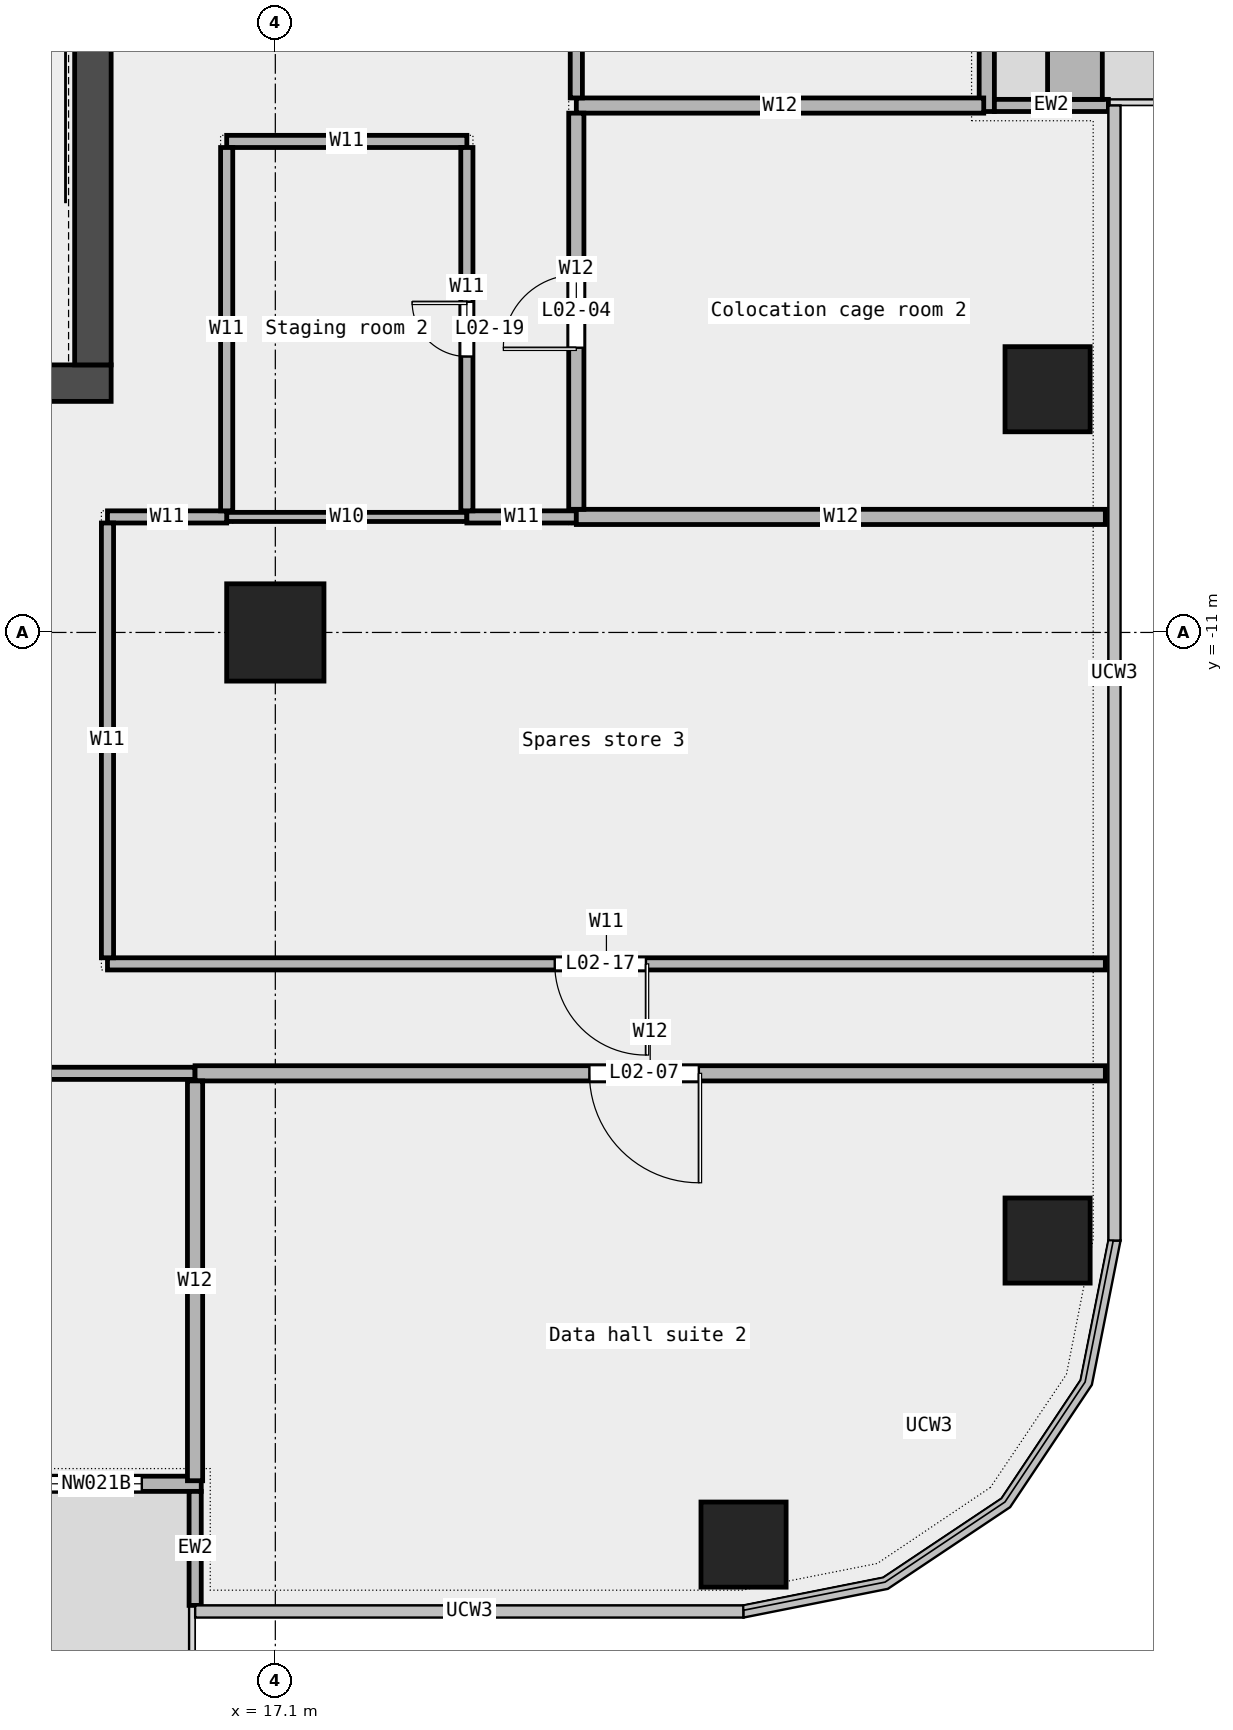
"""IFC4 building model, lengths in metres.
Left out: names, types, materials, properties, quantities, classifications, styles, units other than length and angle.
Written with IfcOpenShell. Run it as: python <this file> out.ifc"""

import sys

from ifc_helpers import new_model, si_unit, direction, frame, frame_2d, origin, origin_2d, place, context, subcontext, project, spatial, rectangle, extrude, element, fill, save


model = new_model("IFC4")
c1 = context("Model", 3, precision=1e-05, world=origin(), true_north=direction((0.0, 1.0)))
c2 = subcontext(c1, "Body", "Model", "MODEL_VIEW")
j1 = project(units=[si_unit("LENGTHUNIT", "METRE"), si_unit("PLANEANGLEUNIT", "RADIAN")], contexts=[c1])
p1 = place(None, origin())
s1 = spatial("IfcSite", under=j1, at=p1, CompositionType="ELEMENT")
p2 = place(p1, origin())
s2 = spatial("IfcBuilding", under=s1, at=p2, CompositionType="ELEMENT")
p3 = place(p2, frame((0.0, 0.0, 14.5)))
s3 = spatial("IfcBuildingStorey", under=s2, at=p3, CompositionType="ELEMENT", Elevation=14.5)
for number, where, z_axis, x_axis in (
    (1, (24.8, -26.0, 0.0), (0.0, 0.0, 1.0), (1.0, 0.0, 0.0)),
    (2, (29.8, -21.0, 0.0), (0.0, 0.0, 1.0), (1.0, 0.0, 0.0)),
    (3, (29.8, -7.0, 0.0), (0.0, 0.0, 1.0), (1.0, 0.0, 0.0)),
):
    element("IfcColumn", number, at=place(p3, frame(where, z_axis=z_axis, x_axis=x_axis)), inside=s3, PredefinedType="COLUMN", context=c2, shape_type="SweptSolid", body=[
        extrude(rectangle(XDim=1.4, YDim=1.4, at=origin_2d()), origin(), (0.0, 0.0, 1.0), 5.0),
    ])
p4 = place(p3, frame((17.1, -11.0, 0.0), z_axis=(0.0, 0.0, 1.0), x_axis=(1.0, 0.0, 0.0)))
e4 = element("IfcColumn", 4, at=p4, inside=s3, PredefinedType="COLUMN", context=c2, shape_type="SweptSolid", body=[
    extrude(rectangle(XDim=1.6, YDim=1.6, at=origin_2d()), origin(), (0.0, 0.0, 1.0), 5.0),
])
p5 = place(p3, frame((2.155, -25.0, 0.0), z_axis=(0.0, 0.0, 1.0), x_axis=(1.0, 0.0, 0.0)))
e5 = element("IfcWall", 5, at=p5, inside=s3, PredefinedType="STANDARD", context=c2, shape_type="SweptSolid", body=[
    extrude(rectangle(XDim=13.727, YDim=0.25, at=frame_2d((6.864, 0.0))), origin(), (0.0, 0.0, 1.0), 5.0),
])
p6 = place(p5, frame((1.75, 0.0, 0.45)))
e6 = element("IfcOpeningElement", 6, at=p6, cuts=e5, PredefinedType="OPENING", context=c2, shape_type="SweptSolid", body=[
    extrude(rectangle(XDim=1.5, YDim=3.0, at=frame_2d((0.75, 1.5))), frame((0.0, 0.137, 0.0), z_axis=(0.0, -1.0, 0.0), x_axis=(1.0, 0.0, 0.0)), (0.0, 0.0, 1.0), 0.274),
])
p7 = place(p5, frame((6.0, 0.0, 0.0)))
e7 = element("IfcOpeningElement", 7, at=p7, cuts=e5, PredefinedType="OPENING", context=c2, shape_type="SweptSolid", body=[
    extrude(rectangle(XDim=1.8, YDim=2.4, at=frame_2d((0.9, 1.2))), frame((0.0, 0.137, 0.0), z_axis=(0.0, -1.0, 0.0), x_axis=(1.0, 0.0, 0.0)), (0.0, 0.0, 1.0), 0.274),
])
p8 = place(p5, frame((11.25, 0.0, 0.45)))
e8 = element("IfcOpeningElement", 8, at=p8, cuts=e5, PredefinedType="OPENING", context=c2, shape_type="SweptSolid", body=[
    extrude(rectangle(XDim=1.5, YDim=3.0, at=frame_2d((0.75, 1.5))), frame((0.0, 0.137, 0.0), z_axis=(0.0, -1.0, 0.0), x_axis=(1.0, 0.0, 0.0)), (0.0, 0.0, 1.0), 0.274),
])
p9 = place(p3, frame((15.782, -27.0, 0.0), z_axis=(0.0, 0.0, 1.0), x_axis=(0.0, 1.0, 0.0)))
e9 = element("IfcWall", 9, at=p9, inside=s3, PredefinedType="STANDARD", context=c2, shape_type="SweptSolid", body=[
    extrude(rectangle(XDim=1.875, YDim=0.2, at=frame_2d((0.938, 0.0))), origin(), (0.0, 0.0, 1.0), 5.0),
])
p10 = place(p3, frame((28.8, -2.433, 0.0), z_axis=(0.0, 0.0, 1.0), x_axis=(0.0, 1.0, 0.0)))
e10 = element("IfcWall", 10, at=p10, inside=s3, PredefinedType="STANDARD", context=c2, shape_type="SweptSolid", body=[
    extrude(rectangle(XDim=14.2, YDim=0.25, at=frame_2d((7.1, 0.0))), origin(), (0.0, 0.0, 1.0), 5.0),
])
p11 = place(p10, frame((1.75, 0.0, 0.45)))
e11 = element("IfcOpeningElement", 11, at=p11, cuts=e10, PredefinedType="OPENING", context=c2, shape_type="SweptSolid", body=[
    extrude(rectangle(XDim=1.5, YDim=3.0, at=frame_2d((0.75, 1.5))), frame((0.0, 0.137, 0.0), z_axis=(0.0, -1.0, 0.0), x_axis=(1.0, 0.0, 0.0)), (0.0, 0.0, 1.0), 0.274),
])
p12 = place(p10, frame((6.25, 0.0, 0.0)))
e12 = element("IfcOpeningElement", 12, at=p12, cuts=e10, PredefinedType="OPENING", context=c2, shape_type="SweptSolid", body=[
    extrude(rectangle(XDim=1.8, YDim=2.4, at=frame_2d((0.9, 1.2))), frame((0.0, 0.137, 0.0), z_axis=(0.0, -1.0, 0.0), x_axis=(1.0, 0.0, 0.0)), (0.0, 0.0, 1.0), 0.274),
])
p13 = place(p10, frame((11.0, 0.0, 0.45)))
e13 = element("IfcOpeningElement", 13, at=p13, cuts=e10, PredefinedType="OPENING", context=c2, shape_type="SweptSolid", body=[
    extrude(rectangle(XDim=1.5, YDim=3.0, at=frame_2d((0.75, 1.5))), frame((0.0, 0.137, 0.0), z_axis=(0.0, -1.0, 0.0), x_axis=(1.0, 0.0, 0.0)), (0.0, 0.0, 1.0), 0.274),
])
p14 = place(p3, frame((30.8, -2.333, 0.0), z_axis=(0.0, 0.0, 1.0), x_axis=(-1.0, 0.0, 0.0)))
e14 = element("IfcWall", 14, at=p14, inside=s3, PredefinedType="STANDARD", context=c2, shape_type="SweptSolid", body=[
    extrude(rectangle(XDim=1.875, YDim=0.2, at=frame_2d((0.938, 0.0))), origin(), (0.0, 0.0, 1.0), 5.0),
])
p15 = place(p3, frame((30.25, -2.233, 0.0), z_axis=(0.0, 0.0, 1.0), x_axis=(0.0, 1.0, 0.0)))
e15 = element("IfcWall", 15, at=p15, inside=s3, PredefinedType="STANDARD", context=c2, shape_type="SweptSolid", body=[
    extrude(rectangle(XDim=3.6, YDim=0.9, at=frame_2d((1.8, 0.0))), origin(), (0.0, 0.0, 1.0), 0.7),
])
p16 = place(p3, frame((2.255, -18.25, 0.0), z_axis=(0.0, 0.0, 1.0), x_axis=(1.0, 0.0, 0.0)))
e16 = element("IfcWall", 16, at=p16, inside=s3, PredefinedType="PARTITIONING", context=c2, shape_type="SweptSolid", body=[
    extrude(rectangle(XDim=13.525, YDim=0.2, at=frame_2d((6.763, 0.0))), origin(), (0.0, 0.0, 1.0), 5.0),
])
p17 = place(p16, frame((6.163, 0.0, 0.0)))
e17 = element("IfcOpeningElement", 17, at=p17, cuts=e16, PredefinedType="OPENING", context=c2, shape_type="SweptSolid", body=[
    extrude(rectangle(XDim=1.2, YDim=2.1, at=frame_2d((0.6, 1.05))), frame((0.0, 0.112, 0.0), z_axis=(0.0, -1.0, 0.0), x_axis=(1.0, 0.0, 0.0)), (0.0, 0.0, 1.0), 0.224),
])
p18 = place(p3, frame((15.78, -18.25, 0.0), z_axis=(0.0, 0.0, 1.0), x_axis=(1.0, 0.0, 0.0)))
e18 = element("IfcWall", 18, at=p18, inside=s3, PredefinedType="PARTITIONING", context=c2, shape_type="SweptSolid", body=[
    extrude(rectangle(XDim=14.97, YDim=0.25, at=frame_2d((7.485, 0.0))), origin(), (0.0, 0.0, 1.0), 5.0),
])
p19 = place(p18, frame((6.485, 0.0, 0.0)))
e19 = element("IfcOpeningElement", 19, at=p19, cuts=e18, PredefinedType="OPENING", context=c2, shape_type="SweptSolid", body=[
    extrude(rectangle(XDim=1.8, YDim=2.1, at=frame_2d((0.9, 1.05))), frame((0.0, 0.137, 0.0), z_axis=(0.0, -1.0, 0.0), x_axis=(1.0, 0.0, 0.0)), (0.0, 0.0, 1.0), 0.274),
])
p20 = place(p3, frame((14.34, -16.45, 0.0), z_axis=(0.0, 0.0, 1.0), x_axis=(1.0, 0.0, 0.0)))
e20 = element("IfcWall", 20, at=p20, inside=s3, PredefinedType="PARTITIONING", context=c2, shape_type="SweptSolid", body=[
    extrude(rectangle(XDim=16.41, YDim=0.2, at=frame_2d((8.205, 0.0))), origin(), (0.0, 0.0, 1.0), 5.0),
])
p21 = place(p20, frame((7.355, 0.0, 0.0)))
e21 = element("IfcOpeningElement", 21, at=p21, cuts=e20, PredefinedType="OPENING", context=c2, shape_type="SweptSolid", body=[
    extrude(rectangle(XDim=1.5, YDim=2.1, at=frame_2d((0.75, 1.05))), frame((0.0, 0.112, 0.0), z_axis=(0.0, -1.0, 0.0), x_axis=(1.0, 0.0, 0.0)), (0.0, 0.0, 1.0), 0.224),
])
p22 = place(p3, frame((16.3, -9.1, 0.0), z_axis=(0.0, 0.0, 1.0), x_axis=(1.0, 0.0, 0.0)))
e22 = element("IfcWall", 22, at=p22, inside=s3, PredefinedType="PARTITIONING", context=c2, shape_type="SweptSolid", body=[
    extrude(rectangle(XDim=3.95, YDim=0.15, at=frame_2d((1.975, 0.0))), origin(), (0.0, 0.0, 1.0), 5.0),
])
p23 = place(p3, frame((14.34, -9.1, 0.0), z_axis=(0.0, 0.0, 1.0), x_axis=(1.0, 0.0, 0.0)))
e23 = element("IfcWall", 23, at=p23, inside=s3, PredefinedType="PARTITIONING", context=c2, shape_type="SweptSolid", body=[
    extrude(rectangle(XDim=1.96, YDim=0.2, at=frame_2d((0.98, 0.0))), origin(), (0.0, 0.0, 1.0), 5.0),
])
p24 = place(p3, frame((20.25, -9.1, 0.0), z_axis=(0.0, 0.0, 1.0), x_axis=(1.0, 0.0, 0.0)))
e24 = element("IfcWall", 24, at=p24, inside=s3, PredefinedType="PARTITIONING", context=c2, shape_type="SweptSolid", body=[
    extrude(rectangle(XDim=1.8, YDim=0.2, at=frame_2d((0.9, 0.0))), origin(), (0.0, 0.0, 1.0), 5.0),
])
p25 = place(p3, frame((22.05, -9.1, 0.0), z_axis=(0.0, 0.0, 1.0), x_axis=(1.0, 0.0, 0.0)))
e25 = element("IfcWall", 25, at=p25, inside=s3, PredefinedType="PARTITIONING", context=c2, shape_type="SweptSolid", body=[
    extrude(rectangle(XDim=8.7, YDim=0.25, at=frame_2d((4.35, 0.0))), origin(), (0.0, 0.0, 1.0), 5.0),
])
p26 = place(p3, frame((16.3, -2.925, 0.0), z_axis=(0.0, 0.0, 1.0), x_axis=(1.0, 0.0, 0.0)))
e26 = element("IfcWall", 26, at=p26, inside=s3, PredefinedType="PARTITIONING", context=c2, shape_type="SweptSolid", body=[
    extrude(rectangle(XDim=3.95, YDim=0.2, at=frame_2d((1.975, 0.0))), origin(), (0.0, 0.0, 1.0), 5.0),
])
p27 = place(p3, frame((22.05, -2.335, 0.0), z_axis=(0.0, 0.0, 1.0), x_axis=(1.0, 0.0, 0.0)))
e27 = element("IfcWall", 27, at=p27, inside=s3, PredefinedType="PARTITIONING", context=c2, shape_type="SweptSolid", body=[
    extrude(rectangle(XDim=6.7, YDim=0.25, at=frame_2d((3.35, 0.0))), origin(), (0.0, 0.0, 1.0), 5.0),
])
p28 = place(p3, frame((14.34, -16.35, 0.0), z_axis=(0.0, 0.0, 1.0), x_axis=(0.0, 1.0, 0.0)))
e28 = element("IfcWall", 28, at=p28, inside=s3, PredefinedType="PARTITIONING", context=c2, shape_type="SweptSolid", body=[
    extrude(rectangle(XDim=7.15, YDim=0.2, at=frame_2d((3.575, 0.0))), origin(), (0.0, 0.0, 1.0), 5.0),
])
p29 = place(p3, frame((15.78, -24.95, 0.0), z_axis=(0.0, 0.0, 1.0), x_axis=(0.0, 1.0, 0.0)))
e29 = element("IfcWall", 29, at=p29, inside=s3, PredefinedType="PARTITIONING", context=c2, shape_type="SweptSolid", body=[
    extrude(rectangle(XDim=6.575, YDim=0.25, at=frame_2d((3.288, 0.0))), origin(), (0.0, 0.0, 1.0), 5.0),
])
p30 = place(p3, frame((16.3, -9.0, 0.0), z_axis=(0.0, 0.0, 1.0), x_axis=(0.0, 1.0, 0.0)))
e30 = element("IfcWall", 30, at=p30, inside=s3, PredefinedType="PARTITIONING", context=c2, shape_type="SweptSolid", body=[
    extrude(rectangle(XDim=5.975, YDim=0.2, at=frame_2d((2.988, 0.0))), origin(), (0.0, 0.0, 1.0), 5.0),
])
p31 = place(p3, frame((20.25, -9.0, 0.0), z_axis=(0.0, 0.0, 1.0), x_axis=(0.0, 1.0, 0.0)))
e31 = element("IfcWall", 31, at=p31, inside=s3, PredefinedType="PARTITIONING", context=c2, shape_type="SweptSolid", body=[
    extrude(rectangle(XDim=5.975, YDim=0.2, at=frame_2d((2.988, 0.0))), origin(), (0.0, 0.0, 1.0), 5.0),
])
p32 = place(p31, frame((2.538, 0.0, 0.0)))
e32 = element("IfcOpeningElement", 32, at=p32, cuts=e31, PredefinedType="OPENING", context=c2, shape_type="SweptSolid", body=[
    extrude(rectangle(XDim=0.9, YDim=2.1, at=frame_2d((0.45, 1.05))), frame((0.0, 0.112, 0.0), z_axis=(0.0, -1.0, 0.0), x_axis=(1.0, 0.0, 0.0)), (0.0, 0.0, 1.0), 0.224),
])
p33 = place(p3, frame((22.05, -2.21, 0.0), z_axis=(0.0, 0.0, 1.0), x_axis=(0.0, 1.0, 0.0)))
e33 = element("IfcWall", 33, at=p33, inside=s3, PredefinedType="PARTITIONING", context=c2, shape_type="SweptSolid", body=[
    extrude(rectangle(XDim=13.75, YDim=0.2, at=frame_2d((6.875, 0.0))), origin(), (0.0, 0.0, 1.0), 5.0),
])
p34 = place(p33, frame((6.125, 0.0, 0.0)))
e34 = element("IfcOpeningElement", 34, at=p34, cuts=e33, PredefinedType="OPENING", context=c2, shape_type="SweptSolid", body=[
    extrude(rectangle(XDim=1.5, YDim=2.1, at=frame_2d((0.75, 1.05))), frame((0.0, 0.112, 0.0), z_axis=(0.0, -1.0, 0.0), x_axis=(1.0, 0.0, 0.0)), (0.0, 0.0, 1.0), 0.224),
])
p35 = place(p3, frame((22.05, -8.975, 0.0), z_axis=(0.0, 0.0, 1.0), x_axis=(0.0, 1.0, 0.0)))
e35 = element("IfcWall", 35, at=p35, inside=s3, PredefinedType="PARTITIONING", context=c2, shape_type="SweptSolid", body=[
    extrude(rectangle(XDim=6.515, YDim=0.25, at=frame_2d((3.258, 0.0))), origin(), (0.0, 0.0, 1.0), 5.0),
])
p36 = place(p35, frame((2.657, 0.0, 0.0)))
e36 = element("IfcOpeningElement", 36, at=p36, cuts=e35, PredefinedType="OPENING", context=c2, shape_type="SweptSolid", body=[
    extrude(rectangle(XDim=1.2, YDim=2.1, at=frame_2d((0.6, 1.05))), frame((0.0, 0.137, 0.0), z_axis=(0.0, -1.0, 0.0), x_axis=(1.0, 0.0, 0.0)), (0.0, 0.0, 1.0), 0.274),
])
p37 = place(p3, frame((-14.4, -6.9, 0.0), z_axis=(0.0, 0.0, 1.0), x_axis=(1.0, 0.0, 0.0)))
e37 = element("IfcWall", 37, at=p37, inside=s3, PredefinedType="SHEAR", context=c2, shape_type="SweptSolid", body=[
    extrude(rectangle(XDim=28.8, YDim=0.6, at=frame_2d((14.4, 0.0))), origin(), (0.0, 0.0, 1.0), 5.2),
])
p38 = place(p37, frame((4.9, 0.0, 0.0)))
e38 = element("IfcOpeningElement", 38, at=p38, cuts=e37, PredefinedType="OPENING", context=c2, shape_type="SweptSolid", body=[
    extrude(rectangle(XDim=1.0, YDim=2.1, at=frame_2d((0.5, 1.05))), frame((0.0, 0.312, 0.0), z_axis=(0.0, -1.0, 0.0), x_axis=(1.0, 0.0, 0.0)), (0.0, 0.0, 1.0), 0.624),
])
p39 = place(p37, frame((9.675, 0.0, 0.0)))
e39 = element("IfcOpeningElement", 39, at=p39, cuts=e37, PredefinedType="OPENING", context=c2, shape_type="SweptSolid", body=[
    extrude(rectangle(XDim=1.2, YDim=2.1, at=frame_2d((0.6, 1.05))), frame((0.0, 0.312, 0.0), z_axis=(0.0, -1.0, 0.0), x_axis=(1.0, 0.0, 0.0)), (0.0, 0.0, 1.0), 0.624),
])
p40 = place(p37, frame((14.837, 0.0, 0.0)))
e40 = element("IfcOpeningElement", 40, at=p40, cuts=e37, PredefinedType="OPENING", context=c2, shape_type="SweptSolid", body=[
    extrude(rectangle(XDim=1.0, YDim=2.1, at=frame_2d((0.5, 1.05))), frame((0.0, 0.312, 0.0), z_axis=(0.0, -1.0, 0.0), x_axis=(1.0, 0.0, 0.0)), (0.0, 0.0, 1.0), 0.624),
])
p41 = place(p37, frame((18.75, 0.0, 0.0)))
e41 = element("IfcOpeningElement", 41, at=p41, cuts=e37, PredefinedType="OPENING", context=c2, shape_type="SweptSolid", body=[
    extrude(rectangle(XDim=1.8, YDim=2.1, at=frame_2d((0.9, 1.05))), frame((0.0, 0.312, 0.0), z_axis=(0.0, -1.0, 0.0), x_axis=(1.0, 0.0, 0.0)), (0.0, 0.0, 1.0), 0.624),
])
p42 = place(p37, frame((23.087, 0.0, 0.0)))
e42 = element("IfcOpeningElement", 42, at=p42, cuts=e37, PredefinedType="OPENING", context=c2, shape_type="SweptSolid", body=[
    extrude(rectangle(XDim=1.0, YDim=2.1, at=frame_2d((0.5, 1.05))), frame((0.0, 0.312, 0.0), z_axis=(0.0, -1.0, 0.0), x_axis=(1.0, 0.0, 0.0)), (0.0, 0.0, 1.0), 0.624),
])
p43 = place(p3, frame((14.1, -6.6, 0.0), z_axis=(0.0, 0.0, 1.0), x_axis=(0.0, 1.0, 0.0)))
e43 = element("IfcWall", 43, at=p43, inside=s3, PredefinedType="SHEAR", context=c2, shape_type="SweptSolid", body=[
    extrude(rectangle(XDim=19.5, YDim=0.6, at=frame_2d((9.75, 0.0))), origin(), (0.0, 0.0, 1.0), 5.2),
])
p44 = place(p43, frame((9.3, 0.0, 0.0)))
e44 = element("IfcOpeningElement", 44, at=p44, cuts=e43, PredefinedType="OPENING", context=c2, shape_type="SweptSolid", body=[
    extrude(rectangle(XDim=1.8, YDim=2.1, at=frame_2d((0.9, 1.05))), frame((0.0, 0.312, 0.0), z_axis=(0.0, -1.0, 0.0), x_axis=(1.0, 0.0, 0.0)), (0.0, 0.0, 1.0), 0.624),
])
p45 = place(p8, origin())
e45 = element("IfcWindow", 45, at=p45, inside=s3, PartitioningType="SINGLE_PANEL", PredefinedType="WINDOW", context=c2, shape_type="SweptSolid", body=[
    extrude(rectangle(XDim=1.5, YDim=3.0, at=frame_2d((0.75, 1.5))), frame((0.0, 0.03, 0.0), z_axis=(0.0, -1.0, 0.0), x_axis=(1.0, 0.0, 0.0)), (0.0, 0.0, 1.0), 0.06),
])
fill(e8, e45)
p46 = place(p36, origin())
e46 = element("IfcDoor", 46, at=p46, inside=s3, OperationType="SINGLE_SWING_LEFT", PredefinedType="DOOR", context=c2, shape_type="SweptSolid", body=[
    extrude(rectangle(XDim=1.2, YDim=2.1, at=frame_2d((0.6, 1.05))), frame((0.0, 0.025, 0.0), z_axis=(0.0, -1.0, 0.0), x_axis=(1.0, 0.0, 0.0)), (0.0, 0.0, 1.0), 0.05),
])
fill(e36, e46)
p47 = place(p19, origin())
e47 = element("IfcDoor", 47, at=p47, inside=s3, OperationType="DOUBLE_DOOR_SINGLE_SWING", PredefinedType="DOOR", context=c2, shape_type="SweptSolid", body=[
    extrude(rectangle(XDim=1.8, YDim=2.1, at=frame_2d((0.9, 1.05))), frame((0.0, 0.025, 0.0), z_axis=(0.0, -1.0, 0.0), x_axis=(1.0, 0.0, 0.0)), (0.0, 0.0, 1.0), 0.05),
])
fill(e19, e47)
p48 = place(p21, origin())
e48 = element("IfcDoor", 48, at=p48, inside=s3, OperationType="DOUBLE_DOOR_SINGLE_SWING", PredefinedType="DOOR", context=c2, shape_type="SweptSolid", body=[
    extrude(rectangle(XDim=1.5, YDim=2.1, at=frame_2d((0.75, 1.05))), frame((0.0, 0.025, 0.0), z_axis=(0.0, -1.0, 0.0), x_axis=(1.0, 0.0, 0.0)), (0.0, 0.0, 1.0), 0.05),
])
fill(e21, e48)
p49 = place(p32, origin())
e49 = element("IfcDoor", 49, at=p49, inside=s3, OperationType="SINGLE_SWING_RIGHT", PredefinedType="DOOR", context=c2, shape_type="SweptSolid", body=[
    extrude(rectangle(XDim=0.9, YDim=2.1, at=frame_2d((0.45, 1.05))), frame((0.0, 0.025, 0.0), z_axis=(0.0, -1.0, 0.0), x_axis=(1.0, 0.0, 0.0)), (0.0, 0.0, 1.0), 0.05),
])
fill(e32, e49)
save(model, sys.argv[1])
